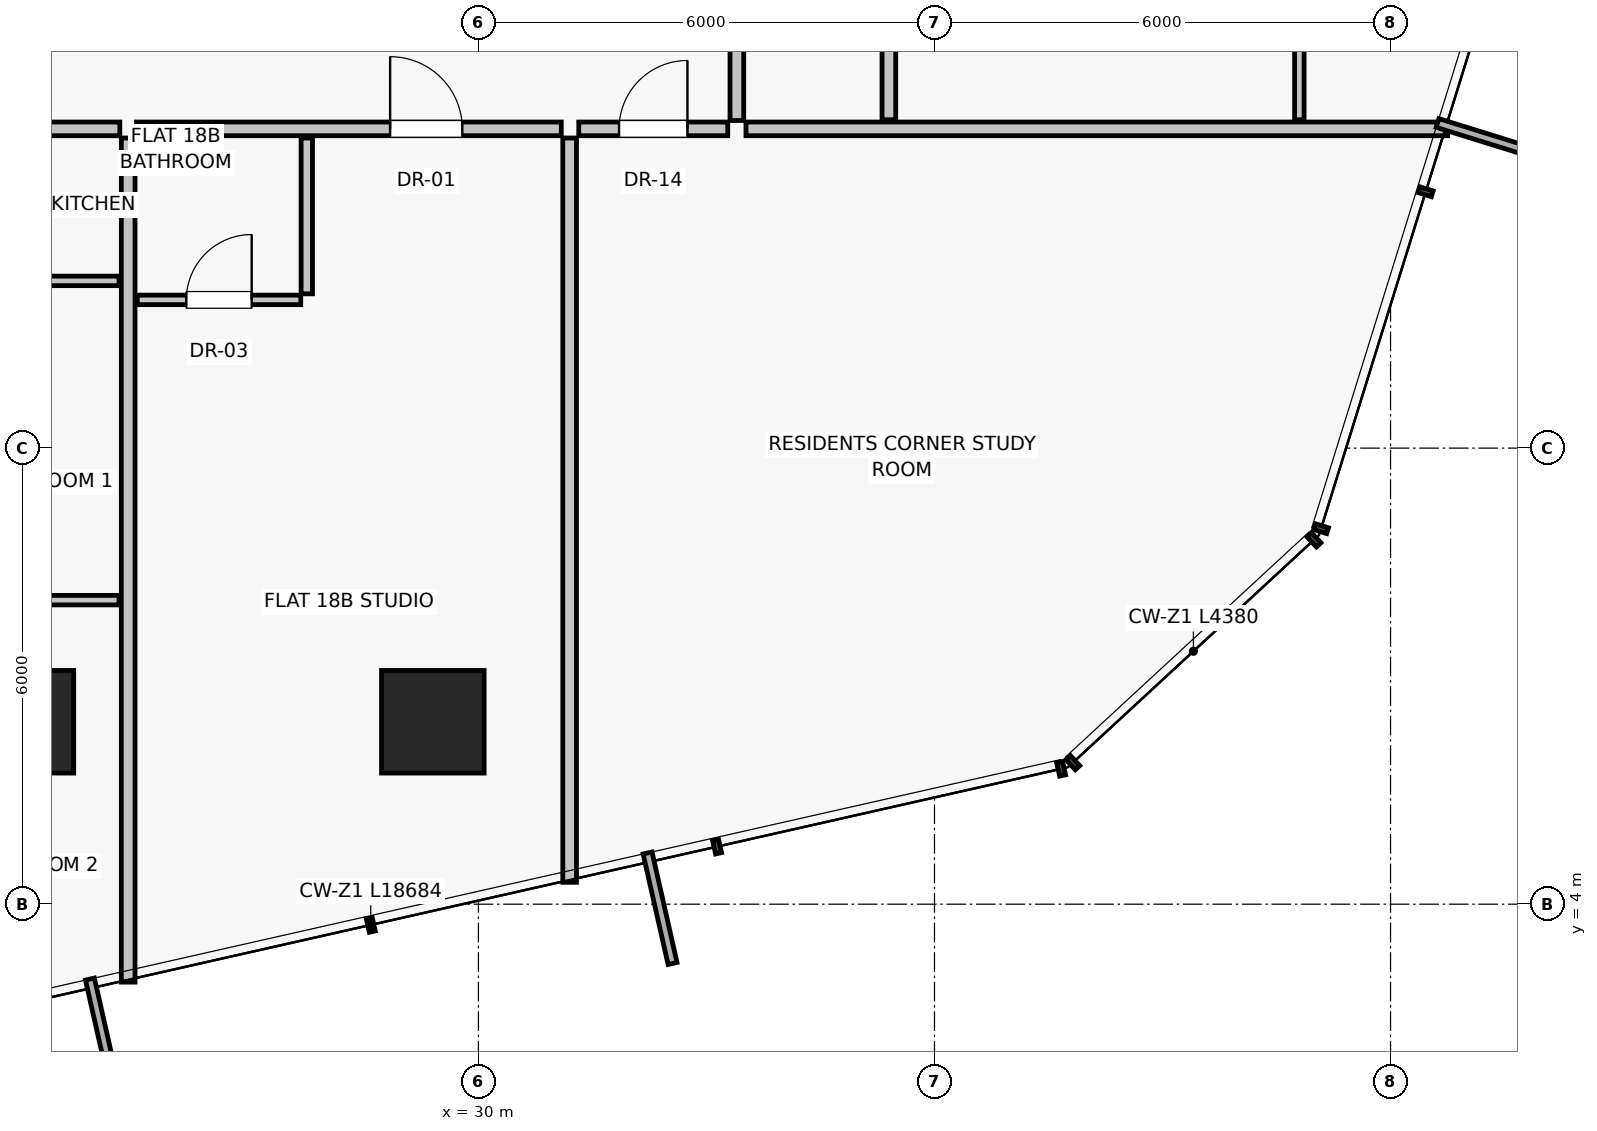
"""IFC4 building model, lengths in metres.
Left out: names, types, materials, properties, quantities, classifications, styles, units other than length and angle.
Written with IfcOpenShell. Run it as: python <this file> out.ifc"""

import sys

from ifc_helpers import new_model, si_unit, direction, frame, frame_2d, origin, origin_2d, place, context, subcontext, project, spatial, rectangle, extrude, source, transform, mapped, element, fill, save


model = new_model("IFC4")
c1 = context("Model", 3, precision=1e-05, world=origin(), true_north=direction((0.0, 1.0)))
c2 = subcontext(c1, "Body", "Model", "MODEL_VIEW")
j1 = project(units=[si_unit("LENGTHUNIT", "METRE"), si_unit("PLANEANGLEUNIT", "RADIAN")], contexts=[c1])
p1 = place(None, origin())
s1 = spatial("IfcSite", under=j1, at=p1, CompositionType="ELEMENT")
p2 = place(p1, origin())
s2 = spatial("IfcBuilding", under=s1, at=p2, CompositionType="ELEMENT")
p3 = place(p2, frame((0.0, 0.0, 67.35)))
s3 = spatial("IfcBuildingStorey", under=s2, at=p3, CompositionType="ELEMENT", Elevation=67.35)
for number, where, z_axis, x_axis in (
    (1, (24.0, 6.4, 0.0), (0.0, 0.0, 1.0), (1.0, 0.0, 0.0)),
    (2, (29.4, 6.4, 0.0), (0.0, 0.0, 1.0), (1.0, 0.0, 0.0)),
):
    element("IfcColumn", number, at=place(p3, frame(where, z_axis=z_axis, x_axis=x_axis)), inside=s3, PredefinedType="COLUMN", context=c2, shape_type="SweptSolid", body=[
        extrude(rectangle(XDim=1.35, YDim=1.35, at=origin_2d()), origin(), (0.0, 0.0, 1.0), 3.25),
    ])
p4 = place(p3, frame((31.2, 14.08, 0.0), z_axis=(0.0, 0.0, 1.0), x_axis=(0.0, -1.0, 0.0)))
e3 = element("IfcWall", 3, at=p4, inside=s3, PredefinedType="PARTITIONING", context=c2, shape_type="SweptSolid", body=[
    extrude(rectangle(XDim=9.792, YDim=0.18, at=frame_2d((4.896, 0.0))), origin(), (0.0, 0.0, 1.0), 3.0),
])
p5 = place(p3, frame((16.91, 14.2, 0.0), z_axis=(0.0, 0.0, 1.0), x_axis=(1.0, 0.0, 0.0)))
e4 = element("IfcWall", 4, at=p5, inside=s3, PredefinedType="PARTITIONING", context=c2, shape_type="SweptSolid", body=[
    extrude(rectangle(XDim=8.372, YDim=0.18, at=frame_2d((4.186, 0.0))), origin(), (0.0, 0.0, 1.0), 3.0),
])
p6 = place(p5, frame((2.903, 0.0, 0.0)))
e5 = element("IfcOpeningElement", 5, at=p6, cuts=e4, PredefinedType="OPENING", context=c2, shape_type="SweptSolid", body=[
    extrude(rectangle(XDim=0.95, YDim=2.02, at=frame_2d((0.475, 1.01))), frame((0.0, 0.1, 0.0), z_axis=(0.0, -1.0, 0.0), x_axis=(1.0, 0.0, 0.0)), (0.0, 0.0, 1.0), 0.2),
])
for number, where, z_axis, x_axis in (
    (6, (21.626, 12.2, 0.0), (0.0, 0.0, 1.0), (1.0, 0.0, 0.0)),
    (7, (21.626, 8.0, 0.0), (0.0, 0.0, 1.0), (1.0, 0.0, 0.0)),
):
    element("IfcWall", number, at=place(p3, frame(where, z_axis=z_axis, x_axis=x_axis)), inside=s3, PredefinedType="PARTITIONING", context=c2, shape_type="SweptSolid", body=[
        extrude(rectangle(XDim=3.646, YDim=0.125, at=frame_2d((1.823, 0.0))), origin(), (0.0, 0.0, 1.0), 3.0),
    ])
p7 = place(p3, frame((25.392, 14.08, 0.0), z_axis=(0.0, 0.0, 1.0), x_axis=(0.0, -1.0, 0.0)))
e8 = element("IfcWall", 8, at=p7, inside=s3, PredefinedType="PARTITIONING", context=c2, shape_type="SweptSolid", body=[
    extrude(rectangle(XDim=11.105, YDim=0.18, at=frame_2d((5.553, 0.0))), origin(), (0.0, 0.0, 1.0), 3.0),
])
p8 = place(p3, frame((25.502, 14.2, 0.0), z_axis=(0.0, 0.0, 1.0), x_axis=(1.0, 0.0, 0.0)))
e9 = element("IfcWall", 9, at=p8, inside=s3, PredefinedType="PARTITIONING", context=c2, shape_type="SweptSolid", body=[
    extrude(rectangle(XDim=5.588, YDim=0.18, at=frame_2d((2.794, 0.0))), origin(), (0.0, 0.0, 1.0), 3.0),
])
p9 = place(p8, frame((3.336, 0.0, 0.0)))
e10 = element("IfcOpeningElement", 10, at=p9, cuts=e9, PredefinedType="OPENING", context=c2, shape_type="SweptSolid", body=[
    extrude(rectangle(XDim=0.95, YDim=2.02, at=frame_2d((0.475, 1.01))), frame((0.0, 0.1, 0.0), z_axis=(0.0, -1.0, 0.0), x_axis=(1.0, 0.0, 0.0)), (0.0, 0.0, 1.0), 0.2),
])
p10 = place(p3, frame((27.742, 14.08, 0.0), z_axis=(0.0, 0.0, 1.0), x_axis=(0.0, -1.0, 0.0)))
e11 = element("IfcWall", 11, at=p10, inside=s3, PredefinedType="PARTITIONING", context=c2, shape_type="SweptSolid", body=[
    extrude(rectangle(XDim=2.05, YDim=0.15, at=frame_2d((1.025, 0.0))), origin(), (0.0, 0.0, 1.0), 3.0),
])
p11 = place(p3, frame((25.512, 11.95, 0.0), z_axis=(0.0, 0.0, 1.0), x_axis=(1.0, 0.0, 0.0)))
e12 = element("IfcWall", 12, at=p11, inside=s3, PredefinedType="PARTITIONING", context=c2, shape_type="SweptSolid", body=[
    extrude(rectangle(XDim=2.15, YDim=0.125, at=frame_2d((1.075, 0.0))), origin(), (0.0, 0.0, 1.0), 2.58),
])
p12 = place(p11, frame((0.645, 0.0, 0.0)))
e13 = element("IfcOpeningElement", 13, at=p12, cuts=e12, PredefinedType="OPENING", context=c2, shape_type="SweptSolid", body=[
    extrude(rectangle(XDim=0.86, YDim=2.01, at=frame_2d((0.43, 1.005))), frame((0.0, 0.073, 0.0), z_axis=(0.0, -1.0, 0.0), x_axis=(1.0, 0.0, 0.0)), (0.0, 0.0, 1.0), 0.145),
])
p13 = place(p3, frame((33.52, 14.2, 0.0), z_axis=(0.0, 0.0, 1.0), x_axis=(1.0, 0.0, 0.0)))
e14 = element("IfcWall", 14, at=p13, inside=s3, PredefinedType="PARTITIONING", context=c2, shape_type="SweptSolid", body=[
    extrude(rectangle(XDim=9.231, YDim=0.18, at=frame_2d((4.616, 0.0))), origin(), (0.0, 0.0, 1.0), 3.0),
])
p14 = place(p3, frame((33.4, 14.31, 0.0), z_axis=(0.0, 0.0, 1.0), x_axis=(0.0, 1.0, 0.0)))
e15 = element("IfcWall", 15, at=p14, inside=s3, PredefinedType="PARTITIONING", context=c2, shape_type="SweptSolid", body=[
    extrude(rectangle(XDim=4.18, YDim=0.18, at=frame_2d((2.09, 0.0))), origin(), (0.0, 0.0, 1.0), 3.0),
])
p15 = place(p14, frame((1.59, 0.0, 0.0)))
e16 = element("IfcOpeningElement", 16, at=p15, cuts=e15, PredefinedType="OPENING", context=c2, shape_type="SweptSolid", body=[
    extrude(rectangle(XDim=1.0, YDim=2.01, at=frame_2d((0.5, 1.005))), frame((0.0, 0.1, 0.0), z_axis=(0.0, -1.0, 0.0), x_axis=(1.0, 0.0, 0.0)), (0.0, 0.0, 1.0), 0.2),
])
p16 = place(p3, frame((40.8, 14.32, 0.0), z_axis=(0.0, 0.0, 1.0), x_axis=(0.0, 1.0, 0.0)))
e17 = element("IfcWall", 17, at=p16, inside=s3, PredefinedType="PARTITIONING", context=c2, shape_type="SweptSolid", body=[
    extrude(rectangle(XDim=4.18, YDim=0.125, at=frame_2d((2.09, 0.0))), origin(), (0.0, 0.0, 1.0), 3.0),
])
p17 = place(p3, frame((35.4, 14.32, 0.0), z_axis=(0.0, 0.0, 1.0), x_axis=(0.0, 1.0, 0.0)))
e18 = element("IfcWall", 18, at=p17, inside=s3, PredefinedType="PARTITIONING", context=c2, shape_type="SweptSolid", body=[
    extrude(rectangle(XDim=4.18, YDim=0.18, at=frame_2d((2.09, 0.0))), origin(), (0.0, 0.0, 1.0), 3.0),
])
p18 = place(p3, frame((31.32, 14.2, 0.0), z_axis=(0.0, 0.0, 1.0), x_axis=(1.0, 0.0, 0.0)))
e19 = element("IfcWall", 19, at=p18, inside=s3, PredefinedType="PARTITIONING", context=c2, shape_type="SweptSolid", body=[
    extrude(rectangle(XDim=1.96, YDim=0.18, at=frame_2d((0.98, 0.0))), origin(), (0.0, 0.0, 1.0), 3.0),
])
p19 = place(p18, frame((0.53, 0.0, 0.0)))
e20 = element("IfcOpeningElement", 20, at=p19, cuts=e19, PredefinedType="OPENING", context=c2, shape_type="SweptSolid", body=[
    extrude(rectangle(XDim=0.9, YDim=2.01, at=frame_2d((0.45, 1.005))), frame((0.0, 0.1, 0.0), z_axis=(0.0, -1.0, 0.0), x_axis=(1.0, 0.0, 0.0)), (0.0, 0.0, 1.0), 0.2),
])
m1 = source(origin(), c2, "Body", "SweptSolid", [
    extrude(rectangle(XDim=0.95, YDim=2.02, at=frame_2d((0.475, 1.01))), frame((0.0, 0.025, 0.0), z_axis=(0.0, -1.0, 0.0), x_axis=(1.0, 0.0, 0.0)), (0.0, 0.0, 1.0), 0.05),
])
p20 = place(p9, origin())
e21 = element("IfcDoor", 21, at=p20, inside=s3, OperationType="SINGLE_SWING_LEFT", PredefinedType="DOOR", context=c2, shape_type="MappedRepresentation", body=[
    mapped(m1, transform((0.0, 0.0, 0.0), scale=1.0)),
])
fill(e10, e21)
m2 = source(origin(), c2, "Body", "SweptSolid", [
    extrude(rectangle(XDim=0.86, YDim=2.01, at=frame_2d((0.43, 1.005))), frame((0.0, 0.025, 0.0), z_axis=(0.0, -1.0, 0.0), x_axis=(1.0, 0.0, 0.0)), (0.0, 0.0, 1.0), 0.05),
])
p21 = place(p12, origin())
e22 = element("IfcDoor", 22, at=p21, inside=s3, OperationType="SINGLE_SWING_RIGHT", PredefinedType="DOOR", context=c2, shape_type="MappedRepresentation", body=[
    mapped(m2, transform((0.0, 0.0, 0.0), scale=1.0)),
])
fill(e13, e22)
m3 = source(origin(), c2, "Body", "SweptSolid", [
    extrude(rectangle(XDim=0.9, YDim=2.01, at=frame_2d((0.45, 1.005))), frame((0.0, 0.025, 0.0), z_axis=(0.0, -1.0, 0.0), x_axis=(1.0, 0.0, 0.0)), (0.0, 0.0, 1.0), 0.05),
])
p22 = place(p19, origin())
e23 = element("IfcDoor", 23, at=p22, inside=s3, OperationType="SINGLE_SWING_RIGHT", PredefinedType="DOOR", context=c2, shape_type="MappedRepresentation", body=[
    mapped(m3, transform((0.0, 0.0, 0.0), scale=1.0)),
])
fill(e20, e23)
save(model, sys.argv[1])
